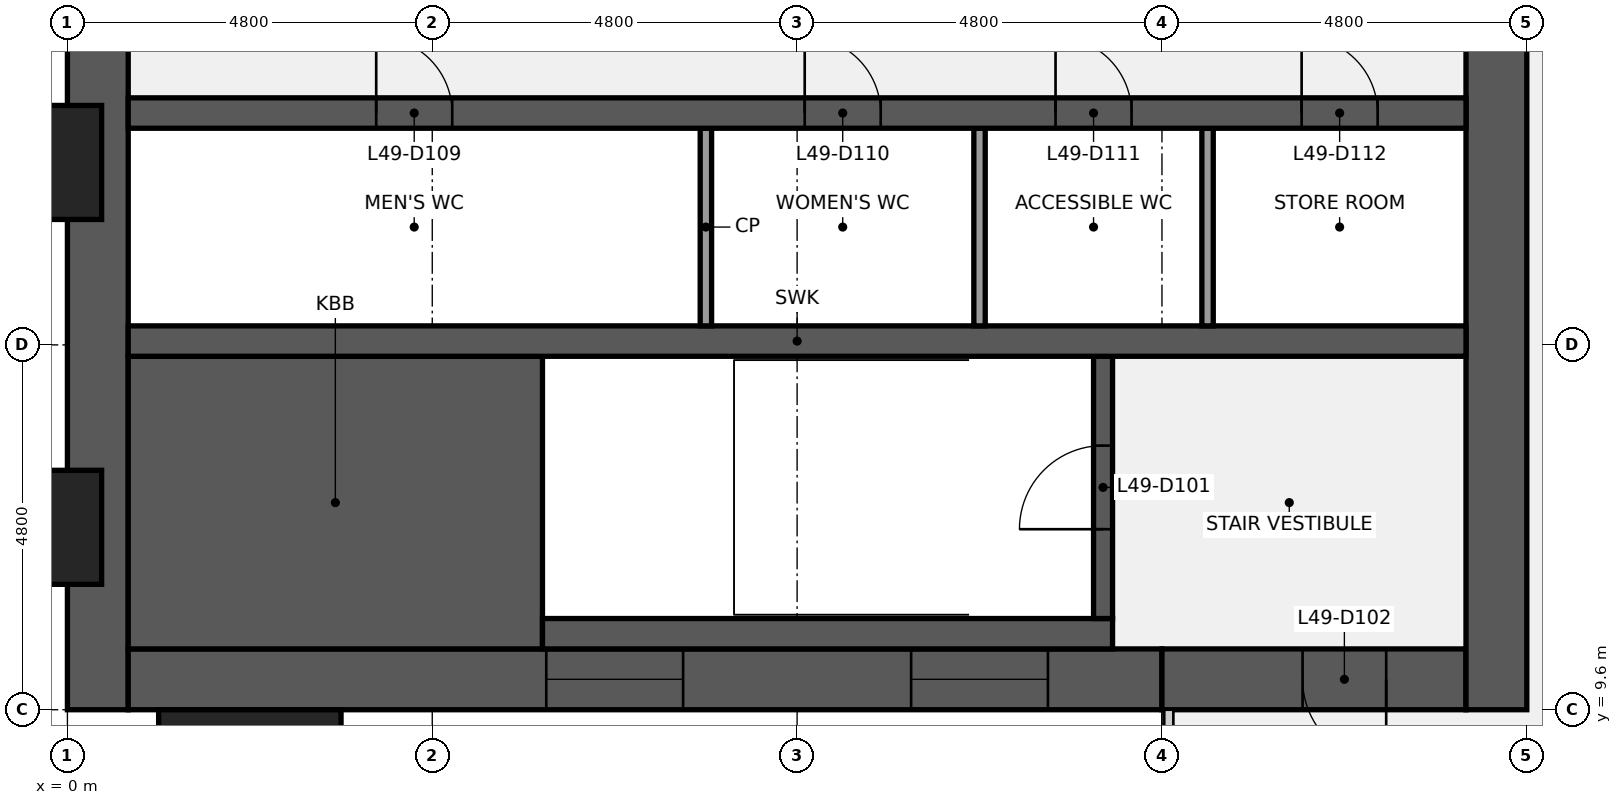
"""IFC4 building model, lengths in metres.
Left out: names, types, materials, properties, quantities, classifications, styles, units other than length and angle.
Written with IfcOpenShell. Run it as: python <this file> out.ifc"""

import sys

from ifc_helpers import new_model, si_unit, direction, frame, frame_2d, origin, origin_2d, place, context, subcontext, project, spatial, rectangle, extrude, element, fill, save


model = new_model("IFC4")
c1 = context("Model", 3, precision=1e-05, world=origin(), true_north=direction((0.0, 1.0)))
c2 = subcontext(c1, "Body", "Model", "MODEL_VIEW")
j1 = project(units=[si_unit("LENGTHUNIT", "METRE"), si_unit("PLANEANGLEUNIT", "RADIAN")], contexts=[c1])
p1 = place(None, origin())
s1 = spatial("IfcSite", under=j1, at=p1, CompositionType="ELEMENT")
p2 = place(p1, origin())
s2 = spatial("IfcBuilding", under=s1, at=p2, CompositionType="ELEMENT")
p3 = place(p2, frame((0.0, 0.0, 225.2)))
s3 = spatial("IfcBuildingStorey", under=s2, at=p3, CompositionType="ELEMENT", Elevation=225.2)
p4 = place(p3, frame((0.4, 9.6, 0.0), z_axis=(0.0, 0.0, 1.0), x_axis=(0.0, 1.0, 0.0)))
e1 = element("IfcWall", 1, at=p4, inside=s3, PredefinedType="SHEAR", context=c2, shape_type="SweptSolid", body=[
    extrude(rectangle(XDim=28.8, YDim=0.8, at=frame_2d((14.4, 0.0))), origin(), (0.0, 0.0, 1.0), 3.84),
])
p5 = place(p4, frame((8.85, 0.0, 0.9)))
e2 = element("IfcOpeningElement", 2, at=p5, cuts=e1, PredefinedType="OPENING", context=c2, shape_type="SweptSolid", body=[
    extrude(rectangle(XDim=1.5, YDim=1.5, at=frame_2d((0.75, 0.75))), frame((0.0, 0.41, 0.0), z_axis=(0.0, -1.0, 0.0), x_axis=(1.0, 0.0, 0.0)), (0.0, 0.0, 1.0), 0.82),
])
p6 = place(p4, frame((18.45, 0.0, 0.9)))
e3 = element("IfcOpeningElement", 3, at=p6, cuts=e1, PredefinedType="OPENING", context=c2, shape_type="SweptSolid", body=[
    extrude(rectangle(XDim=1.5, YDim=1.5, at=frame_2d((0.75, 0.75))), frame((0.0, 0.41, 0.0), z_axis=(0.0, -1.0, 0.0), x_axis=(1.0, 0.0, 0.0)), (0.0, 0.0, 1.0), 0.82),
])
p7 = place(p3, frame((14.4, 10.0, 0.0), z_axis=(0.0, 0.0, 1.0), x_axis=(-1.0, 0.0, 0.0)))
e4 = element("IfcWall", 4, at=p7, inside=s3, PredefinedType="SHEAR", context=c2, shape_type="SweptSolid", body=[
    extrude(rectangle(XDim=13.6, YDim=0.8, at=frame_2d((6.8, 0.0))), origin(), (0.0, 0.0, 1.0), 3.84),
])
p8 = place(p7, frame((6.3, 0.0, 0.9)))
e5 = element("IfcOpeningElement", 5, at=p8, cuts=e4, PredefinedType="OPENING", context=c2, shape_type="SweptSolid", body=[
    extrude(rectangle(XDim=1.8, YDim=1.5, at=frame_2d((0.9, 0.75))), frame((0.0, 0.41, 0.0), z_axis=(0.0, -1.0, 0.0), x_axis=(1.0, 0.0, 0.0)), (0.0, 0.0, 1.0), 0.82),
])
p9 = place(p7, frame((1.5, 0.0, 0.9)))
e6 = element("IfcOpeningElement", 6, at=p9, cuts=e4, PredefinedType="OPENING", context=c2, shape_type="SweptSolid", body=[
    extrude(rectangle(XDim=1.8, YDim=1.5, at=frame_2d((0.9, 0.75))), frame((0.0, 0.41, 0.0), z_axis=(0.0, -1.0, 0.0), x_axis=(1.0, 0.0, 0.0)), (0.0, 0.0, 1.0), 0.82),
])
p10 = place(p3, frame((18.4, 10.0, 0.0), z_axis=(0.0, 0.0, 1.0), x_axis=(-1.0, 0.0, 0.0)))
e7 = element("IfcWall", 7, at=p10, inside=s3, PredefinedType="SHEAR", context=c2, shape_type="SweptSolid", body=[
    extrude(rectangle(XDim=4.0, YDim=0.8, at=frame_2d((2.0, 0.0))), origin(), (0.0, 0.0, 1.0), 3.84),
])
p11 = place(p10, frame((1.05, 0.0, 0.0)))
e8 = element("IfcOpeningElement", 8, at=p11, cuts=e7, PredefinedType="OPENING", context=c2, shape_type="SweptSolid", body=[
    extrude(rectangle(XDim=1.1, YDim=2.1, at=frame_2d((0.55, 1.05))), frame((0.0, 0.41, 0.0), z_axis=(0.0, -1.0, 0.0), x_axis=(1.0, 0.0, 0.0)), (0.0, 0.0, 1.0), 0.82),
])
p12 = place(p3, frame((18.8, 38.4, 0.0), z_axis=(0.0, 0.0, 1.0), x_axis=(0.0, -1.0, 0.0)))
e9 = element("IfcWall", 9, at=p12, inside=s3, PredefinedType="SHEAR", context=c2, shape_type="SweptSolid", body=[
    extrude(rectangle(XDim=28.8, YDim=0.8, at=frame_2d((14.4, 0.0))), origin(), (0.0, 0.0, 1.0), 3.84),
])
p13 = place(p12, frame((18.3, 0.0, 0.0)))
e10 = element("IfcOpeningElement", 10, at=p13, cuts=e9, PredefinedType="OPENING", context=c2, shape_type="SweptSolid", body=[
    extrude(rectangle(XDim=1.8, YDim=2.1, at=frame_2d((0.9, 1.05))), frame((0.0, 0.41, 0.0), z_axis=(0.0, -1.0, 0.0), x_axis=(1.0, 0.0, 0.0)), (0.0, 0.0, 1.0), 0.82),
])
p14 = place(p12, frame((8.7, 0.0, 0.0)))
e11 = element("IfcOpeningElement", 11, at=p14, cuts=e9, PredefinedType="OPENING", context=c2, shape_type="SweptSolid", body=[
    extrude(rectangle(XDim=1.8, YDim=2.1, at=frame_2d((0.9, 1.05))), frame((0.0, 0.41, 0.0), z_axis=(0.0, -1.0, 0.0), x_axis=(1.0, 0.0, 0.0)), (0.0, 0.0, 1.0), 0.82),
])
p15 = place(p3, frame((0.8, 12.325, 0.0), z_axis=(0.0, 0.0, 1.0), x_axis=(1.0, 0.0, 0.0)))
e12 = element("IfcWall", 12, at=p15, inside=s3, PredefinedType="SHEAR", context=c2, shape_type="SweptSolid", body=[
    extrude(rectangle(XDim=5.45, YDim=3.85, at=frame_2d((2.725, 0.0))), origin(), (0.0, 0.0, 1.0), 3.84),
])
p16 = place(p3, frame((6.25, 10.6, 0.0), z_axis=(0.0, 0.0, 1.0), x_axis=(1.0, 0.0, 0.0)))
e13 = element("IfcWall", 13, at=p16, inside=s3, PredefinedType="SHEAR", context=c2, shape_type="SweptSolid", body=[
    extrude(rectangle(XDim=7.5, YDim=0.4, at=frame_2d((3.75, 0.0))), origin(), (0.0, 0.0, 1.0), 3.84),
])
p17 = place(p3, frame((13.625, 10.8, 0.0), z_axis=(0.0, 0.0, 1.0), x_axis=(0.0, 1.0, 0.0)))
e14 = element("IfcWall", 14, at=p17, inside=s3, PredefinedType="SHEAR", context=c2, shape_type="SweptSolid", body=[
    extrude(rectangle(XDim=3.45, YDim=0.25, at=frame_2d((1.725, 0.0))), origin(), (0.0, 0.0, 1.0), 3.84),
])
p18 = place(p17, frame((1.175, 0.0, 0.0)))
e15 = element("IfcOpeningElement", 15, at=p18, cuts=e14, PredefinedType="OPENING", context=c2, shape_type="SweptSolid", body=[
    extrude(rectangle(XDim=1.1, YDim=2.1, at=frame_2d((0.55, 1.05))), frame((0.0, 0.135, 0.0), z_axis=(0.0, -1.0, 0.0), x_axis=(1.0, 0.0, 0.0)), (0.0, 0.0, 1.0), 0.27),
])
p19 = place(p3, frame((0.8, 14.45, 0.0), z_axis=(0.0, 0.0, 1.0), x_axis=(1.0, 0.0, 0.0)))
e16 = element("IfcWall", 16, at=p19, inside=s3, PredefinedType="SHEAR", context=c2, shape_type="SweptSolid", body=[
    extrude(rectangle(XDim=17.6, YDim=0.4, at=frame_2d((8.8, 0.0))), origin(), (0.0, 0.0, 1.0), 3.84),
])
for number, where, z_axis, x_axis in (
    (17, (8.4, 14.65, 0.0), (0.0, 0.0, 1.0), (0.0, 1.0, 0.0)),
    (18, (12.0, 14.65, 0.0), (0.0, 0.0, 1.0), (0.0, 1.0, 0.0)),
    (19, (15.0, 14.65, 0.0), (0.0, 0.0, 1.0), (0.0, 1.0, 0.0)),
):
    element("IfcWall", number, at=place(p3, frame(where, z_axis=z_axis, x_axis=x_axis)), inside=s3, PredefinedType="PARTITIONING", context=c2, shape_type="SweptSolid", body=[
        extrude(rectangle(XDim=2.6, YDim=0.15, at=frame_2d((1.3, 0.0))), origin(), (0.0, 0.0, 1.0), 3.84),
    ])
p20 = place(p3, frame((0.8, 17.45, 0.0), z_axis=(0.0, 0.0, 1.0), x_axis=(1.0, 0.0, 0.0)))
e20 = element("IfcWall", 20, at=p20, inside=s3, PredefinedType="SHEAR", context=c2, shape_type="SweptSolid", body=[
    extrude(rectangle(XDim=17.6, YDim=0.4, at=frame_2d((8.8, 0.0))), origin(), (0.0, 0.0, 1.0), 3.84),
])
p21 = place(p20, frame((3.262, 0.0, 0.0)))
e21 = element("IfcOpeningElement", 21, at=p21, cuts=e20, PredefinedType="OPENING", context=c2, shape_type="SweptSolid", body=[
    extrude(rectangle(XDim=1.0, YDim=2.1, at=frame_2d((0.5, 1.05))), frame((0.0, 0.21, 0.0), z_axis=(0.0, -1.0, 0.0), x_axis=(1.0, 0.0, 0.0)), (0.0, 0.0, 1.0), 0.42),
])
p22 = place(p20, frame((8.9, 0.0, 0.0)))
e22 = element("IfcOpeningElement", 22, at=p22, cuts=e20, PredefinedType="OPENING", context=c2, shape_type="SweptSolid", body=[
    extrude(rectangle(XDim=1.0, YDim=2.1, at=frame_2d((0.5, 1.05))), frame((0.0, 0.21, 0.0), z_axis=(0.0, -1.0, 0.0), x_axis=(1.0, 0.0, 0.0)), (0.0, 0.0, 1.0), 0.42),
])
p23 = place(p20, frame((12.2, 0.0, 0.0)))
e23 = element("IfcOpeningElement", 23, at=p23, cuts=e20, PredefinedType="OPENING", context=c2, shape_type="SweptSolid", body=[
    extrude(rectangle(XDim=1.0, YDim=2.1, at=frame_2d((0.5, 1.05))), frame((0.0, 0.21, 0.0), z_axis=(0.0, -1.0, 0.0), x_axis=(1.0, 0.0, 0.0)), (0.0, 0.0, 1.0), 0.42),
])
p24 = place(p20, frame((15.438, 0.0, 0.0)))
e24 = element("IfcOpeningElement", 24, at=p24, cuts=e20, PredefinedType="OPENING", context=c2, shape_type="SweptSolid", body=[
    extrude(rectangle(XDim=1.0, YDim=2.1, at=frame_2d((0.5, 1.05))), frame((0.0, 0.21, 0.0), z_axis=(0.0, -1.0, 0.0), x_axis=(1.0, 0.0, 0.0)), (0.0, 0.0, 1.0), 0.42),
])
for number, where, z_axis, x_axis in (
    (25, (-0.75, 12.0, 0.0), (0.0, 0.0, 1.0), (0.0, 1.0, 0.0)),
    (26, (-0.75, 16.8, 0.0), (0.0, 0.0, 1.0), (0.0, 1.0, 0.0)),
    (27, (2.4, 8.85, 0.0), (0.0, 0.0, 1.0), (1.0, 0.0, 0.0)),
):
    element("IfcColumn", number, at=place(p3, frame(where, z_axis=z_axis, x_axis=x_axis)), inside=s3, PredefinedType="PILASTER", context=c2, shape_type="SweptSolid", body=[
        extrude(rectangle(XDim=2.4, YDim=1.5, at=origin_2d()), origin(), (0.0, 0.0, 1.0), 4.0),
    ])
p25 = place(p18, origin())
e28 = element("IfcDoor", 28, at=p25, inside=s3, OperationType="SINGLE_SWING_LEFT", PredefinedType="DOOR", context=c2, shape_type="SweptSolid", body=[
    extrude(rectangle(XDim=1.1, YDim=2.1, at=frame_2d((0.55, 1.05))), frame((0.0, 0.025, 0.0), z_axis=(0.0, -1.0, 0.0), x_axis=(1.0, 0.0, 0.0)), (0.0, 0.0, 1.0), 0.05),
])
fill(e15, e28)
p26 = place(p11, origin())
e29 = element("IfcDoor", 29, at=p26, inside=s3, OperationType="SINGLE_SWING_LEFT", PredefinedType="DOOR", context=c2, shape_type="SweptSolid", body=[
    extrude(rectangle(XDim=1.1, YDim=2.1, at=frame_2d((0.55, 1.05))), frame((0.0, 0.025, 0.0), z_axis=(0.0, -1.0, 0.0), x_axis=(1.0, 0.0, 0.0)), (0.0, 0.0, 1.0), 0.05),
])
fill(e8, e29)
p27 = place(p21, origin())
e30 = element("IfcDoor", 30, at=p27, inside=s3, OperationType="SINGLE_SWING_LEFT", PredefinedType="DOOR", context=c2, shape_type="SweptSolid", body=[
    extrude(rectangle(XDim=1.0, YDim=2.1, at=frame_2d((0.5, 1.05))), frame((0.0, 0.025, 0.0), z_axis=(0.0, -1.0, 0.0), x_axis=(1.0, 0.0, 0.0)), (0.0, 0.0, 1.0), 0.05),
])
fill(e21, e30)
p28 = place(p22, origin())
e31 = element("IfcDoor", 31, at=p28, inside=s3, OperationType="SINGLE_SWING_LEFT", PredefinedType="DOOR", context=c2, shape_type="SweptSolid", body=[
    extrude(rectangle(XDim=1.0, YDim=2.1, at=frame_2d((0.5, 1.05))), frame((0.0, 0.025, 0.0), z_axis=(0.0, -1.0, 0.0), x_axis=(1.0, 0.0, 0.0)), (0.0, 0.0, 1.0), 0.05),
])
fill(e22, e31)
p29 = place(p23, origin())
e32 = element("IfcDoor", 32, at=p29, inside=s3, OperationType="SINGLE_SWING_LEFT", PredefinedType="DOOR", context=c2, shape_type="SweptSolid", body=[
    extrude(rectangle(XDim=1.0, YDim=2.1, at=frame_2d((0.5, 1.05))), frame((0.0, 0.025, 0.0), z_axis=(0.0, -1.0, 0.0), x_axis=(1.0, 0.0, 0.0)), (0.0, 0.0, 1.0), 0.05),
])
fill(e23, e32)
p30 = place(p24, origin())
e33 = element("IfcDoor", 33, at=p30, inside=s3, OperationType="SINGLE_SWING_LEFT", PredefinedType="DOOR", context=c2, shape_type="SweptSolid", body=[
    extrude(rectangle(XDim=1.0, YDim=2.1, at=frame_2d((0.5, 1.05))), frame((0.0, 0.025, 0.0), z_axis=(0.0, -1.0, 0.0), x_axis=(1.0, 0.0, 0.0)), (0.0, 0.0, 1.0), 0.05),
])
fill(e24, e33)
p31 = place(p8, origin())
e34 = element("IfcWindow", 34, at=p31, inside=s3, PartitioningType="SINGLE_PANEL", PredefinedType="WINDOW", context=c2, shape_type="SweptSolid", body=[
    extrude(rectangle(XDim=1.8, YDim=1.5, at=frame_2d((0.9, 0.75))), frame((0.0, 0.03, 0.0), z_axis=(0.0, -1.0, 0.0), x_axis=(1.0, 0.0, 0.0)), (0.0, 0.0, 1.0), 0.06),
])
fill(e5, e34)
p32 = place(p9, origin())
e35 = element("IfcWindow", 35, at=p32, inside=s3, PartitioningType="SINGLE_PANEL", PredefinedType="WINDOW", context=c2, shape_type="SweptSolid", body=[
    extrude(rectangle(XDim=1.8, YDim=1.5, at=frame_2d((0.9, 0.75))), frame((0.0, 0.03, 0.0), z_axis=(0.0, -1.0, 0.0), x_axis=(1.0, 0.0, 0.0)), (0.0, 0.0, 1.0), 0.06),
])
fill(e6, e35)
save(model, sys.argv[1])
